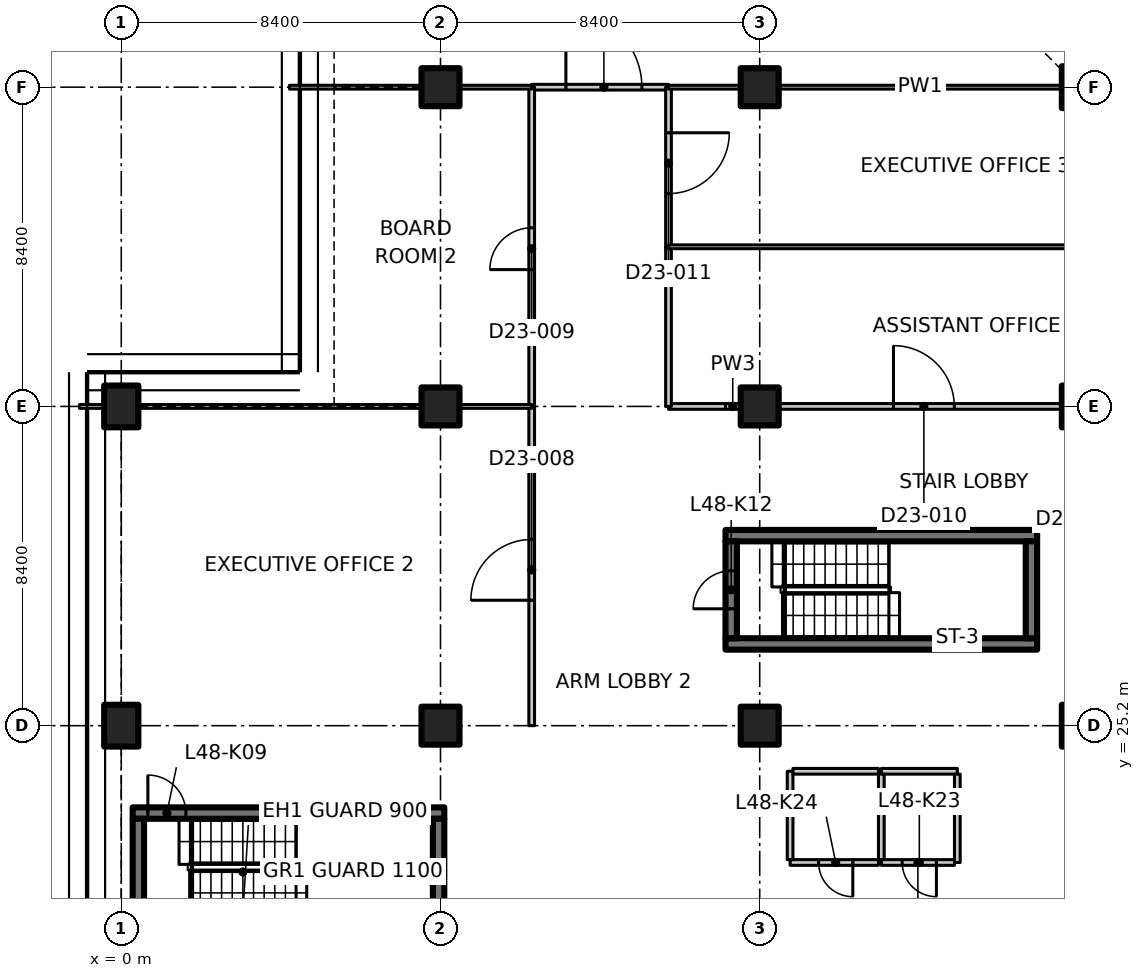
"""IFC4 building model, lengths in metres.
Left out: names, types, materials, properties, quantities, classifications, styles, units other than length and angle.
Written with IfcOpenShell. Run it as: python <this file> out.ifc"""

import sys

from ifc_helpers import new_model, si_unit, direction, frame, frame_2d, origin, origin_2d, place, context, subcontext, project, spatial, polyline, rectangle, outline, extrude, element, fill, save


model = new_model("IFC4")
c1 = context("Model", 3, precision=1e-05, world=origin(), true_north=direction((0.0, 1.0)))
c2 = subcontext(c1, "Body", "Model", "MODEL_VIEW")
j1 = project(units=[si_unit("LENGTHUNIT", "METRE"), si_unit("PLANEANGLEUNIT", "RADIAN")], contexts=[c1])
p1 = place(None, origin())
s1 = spatial("IfcSite", under=j1, at=p1, CompositionType="ELEMENT")
p2 = place(p1, origin())
s2 = spatial("IfcBuilding", under=s1, at=p2, CompositionType="ELEMENT")
p3 = place(p2, frame((0.0, 0.0, 192.0)))
s3 = spatial("IfcBuildingStorey", under=s2, at=p3, CompositionType="ELEMENT", Elevation=192.0)
for number, where, z_axis, x_axis in (
    (1, (0.0, 25.2, 0.0), (0.0, 0.0, 1.0), (1.0, 0.0, 0.0)),
    (2, (0.0, 33.6, 0.0), (0.0, 0.0, 1.0), (1.0, 0.0, 0.0)),
):
    element("IfcColumn", number, at=place(p3, frame(where, z_axis=z_axis, x_axis=x_axis)), inside=s3, PredefinedType="COLUMN", context=c2, shape_type="SweptSolid", body=[
        extrude(rectangle(XDim=0.9, YDim=1.1, at=origin_2d()), origin(), (0.0, 0.0, 1.0), 3.35),
    ])
for number, where, z_axis, x_axis in (
    (3, (8.4, 25.2, 0.0), (0.0, 0.0, 1.0), (1.0, 0.0, 0.0)),
    (4, (8.4, 33.6, 0.0), (0.0, 0.0, 1.0), (1.0, 0.0, 0.0)),
    (5, (8.4, 42.0, 0.0), (0.0, 0.0, 1.0), (1.0, 0.0, 0.0)),
    (6, (16.8, 25.2, 0.0), (0.0, 0.0, 1.0), (1.0, 0.0, 0.0)),
    (7, (16.8, 33.6, 0.0), (0.0, 0.0, 1.0), (1.0, 0.0, 0.0)),
    (8, (16.8, 42.0, 0.0), (0.0, 0.0, 1.0), (1.0, 0.0, 0.0)),
):
    element("IfcColumn", number, at=place(p3, frame(where, z_axis=z_axis, x_axis=x_axis)), inside=s3, PredefinedType="COLUMN", context=c2, shape_type="SweptSolid", body=[
        extrude(rectangle(XDim=1.0, YDim=1.0, at=origin_2d()), origin(), (0.0, 0.0, 1.0), 3.35),
    ])
for number, where, z_axis, x_axis in (
    (9, (25.2, 25.2, 0.0), (0.0, 0.0, 1.0), (1.0, 0.0, 0.0)),
    (10, (25.2, 33.6, 0.0), (0.0, 0.0, 1.0), (1.0, 0.0, 0.0)),
    (11, (25.2, 42.0, 0.0), (0.0, 0.0, 1.0), (1.0, 0.0, 0.0)),
):
    element("IfcColumn", number, at=place(p3, frame(where, z_axis=z_axis, x_axis=x_axis)), inside=s3, PredefinedType="COLUMN", context=c2, shape_type="SweptSolid", body=[
        extrude(rectangle(XDim=0.9, YDim=1.1, at=origin_2d()), origin(), (0.0, 0.0, 1.0), 3.35),
    ])
p4 = place(p3, frame((0.3, 22.9, 0.0), z_axis=(0.0, 0.0, 1.0), x_axis=(1.0, 0.0, 0.0)))
e12 = element("IfcWall", 12, at=p4, inside=s3, PredefinedType="SHEAR", context=c2, shape_type="SweptSolid", body=[
    extrude(rectangle(XDim=8.2, YDim=0.3, at=frame_2d((4.1, 0.0))), origin(), (0.0, 0.0, 1.0), 3.35),
])
p5 = place(p4, frame((0.4, 0.0, 0.0)))
e13 = element("IfcOpeningElement", 13, at=p5, cuts=e12, PredefinedType="OPENING", context=c2, shape_type="SweptSolid", body=[
    extrude(rectangle(XDim=1.0, YDim=2.1, at=frame_2d((0.5, 1.05))), frame((0.0, 0.16, 0.0), z_axis=(0.0, -1.0, 0.0), x_axis=(1.0, 0.0, 0.0)), (0.0, 0.0, 1.0), 0.32),
])
for number, where, z_axis, x_axis in (
    (14, (0.45, 20.2, 0.0), (0.0, 0.0, 1.0), (0.0, 1.0, 0.0)),
    (15, (8.35, 20.2, 0.0), (0.0, 0.0, 1.0), (0.0, 1.0, 0.0)),
):
    element("IfcWall", number, at=place(p3, frame(where, z_axis=z_axis, x_axis=x_axis)), inside=s3, PredefinedType="SHEAR", context=c2, shape_type="SweptSolid", body=[
        extrude(rectangle(XDim=2.55, YDim=0.3, at=frame_2d((1.275, 0.0))), origin(), (0.0, 0.0, 1.0), 3.35),
    ])
for number, where, z_axis, x_axis in (
    (16, (15.9, 27.35, 0.0), (0.0, 0.0, 1.0), (1.0, 0.0, 0.0)),
    (17, (15.9, 30.2, 0.0), (0.0, 0.0, 1.0), (1.0, 0.0, 0.0)),
):
    element("IfcWall", number, at=place(p3, frame(where, z_axis=z_axis, x_axis=x_axis)), inside=s3, PredefinedType="SHEAR", context=c2, shape_type="SweptSolid", body=[
        extrude(rectangle(XDim=8.2, YDim=0.3, at=frame_2d((4.1, 0.0))), origin(), (0.0, 0.0, 1.0), 3.35),
    ])
p6 = place(p3, frame((16.05, 27.5, 0.0), z_axis=(0.0, 0.0, 1.0), x_axis=(0.0, 1.0, 0.0)))
e18 = element("IfcWall", 18, at=p6, inside=s3, PredefinedType="SHEAR", context=c2, shape_type="SweptSolid", body=[
    extrude(rectangle(XDim=2.55, YDim=0.3, at=frame_2d((1.275, 0.0))), origin(), (0.0, 0.0, 1.0), 3.35),
])
p7 = place(p6, frame((0.775, 0.0, 0.0)))
e19 = element("IfcOpeningElement", 19, at=p7, cuts=e18, PredefinedType="OPENING", context=c2, shape_type="SweptSolid", body=[
    extrude(rectangle(XDim=1.0, YDim=2.1, at=frame_2d((0.5, 1.05))), frame((0.0, 0.16, 0.0), z_axis=(0.0, -1.0, 0.0), x_axis=(1.0, 0.0, 0.0)), (0.0, 0.0, 1.0), 0.32),
])
p8 = place(p3, frame((23.95, 27.5, 0.0), z_axis=(0.0, 0.0, 1.0), x_axis=(0.0, 1.0, 0.0)))
e20 = element("IfcWall", 20, at=p8, inside=s3, PredefinedType="SHEAR", context=c2, shape_type="SweptSolid", body=[
    extrude(rectangle(XDim=2.55, YDim=0.3, at=frame_2d((1.275, 0.0))), origin(), (0.0, 0.0, 1.0), 3.35),
])
p9 = place(p3, frame((20.0, 24.0, 0.0), z_axis=(0.0, 0.0, 1.0), x_axis=(1.0, 0.0, 0.0)))
e21 = element("IfcWall", 21, at=p9, inside=s3, PredefinedType="PARTITIONING", context=c2, shape_type="SweptSolid", body=[
    extrude(rectangle(XDim=2.0, YDim=0.15, at=frame_2d((1.0, 0.0))), origin(), (0.0, 0.0, 1.0), 3.35),
])
p10 = place(p3, frame((22.0, 23.925, 0.0), z_axis=(0.0, 0.0, 1.0), x_axis=(0.0, -1.0, 0.0)))
e22 = element("IfcWall", 22, at=p10, inside=s3, PredefinedType="PARTITIONING", context=c2, shape_type="SweptSolid", body=[
    extrude(rectangle(XDim=2.325, YDim=0.15, at=frame_2d((1.163, 0.0))), origin(), (0.0, 0.0, 1.0), 3.35),
])
p11 = place(p3, frame((21.925, 21.6, 0.0), z_axis=(0.0, 0.0, 1.0), x_axis=(-1.0, 0.0, 0.0)))
e23 = element("IfcWall", 23, at=p11, inside=s3, PredefinedType="PARTITIONING", context=c2, shape_type="SweptSolid", body=[
    extrude(rectangle(XDim=1.925, YDim=0.15, at=frame_2d((0.962, 0.0))), origin(), (0.0, 0.0, 1.0), 3.35),
])
p12 = place(p11, frame((0.475, 0.0, 0.0)))
e24 = element("IfcOpeningElement", 24, at=p12, cuts=e23, PredefinedType="OPENING", context=c2, shape_type="SweptSolid", body=[
    extrude(rectangle(XDim=0.9, YDim=2.1, at=frame_2d((0.45, 1.05))), frame((0.0, 0.085, 0.0), z_axis=(0.0, -1.0, 0.0), x_axis=(1.0, 0.0, 0.0)), (0.0, 0.0, 1.0), 0.17),
])
p13 = place(p3, frame((20.0, 21.675, 0.0), z_axis=(0.0, 0.0, 1.0), x_axis=(0.0, 1.0, 0.0)))
e25 = element("IfcWall", 25, at=p13, inside=s3, PredefinedType="PARTITIONING", context=c2, shape_type="SweptSolid", body=[
    extrude(rectangle(XDim=2.25, YDim=0.15, at=frame_2d((1.125, 0.0))), origin(), (0.0, 0.0, 1.0), 3.35),
])
p14 = place(p3, frame((19.925, 21.6, 0.0), z_axis=(0.0, 0.0, 1.0), x_axis=(-1.0, 0.0, 0.0)))
e26 = element("IfcWall", 26, at=p14, inside=s3, PredefinedType="PARTITIONING", context=c2, shape_type="SweptSolid", body=[
    extrude(rectangle(XDim=2.325, YDim=0.15, at=frame_2d((1.163, 0.0))), origin(), (0.0, 0.0, 1.0), 3.35),
])
p15 = place(p14, frame((0.675, 0.0, 0.0)))
e27 = element("IfcOpeningElement", 27, at=p15, cuts=e26, PredefinedType="OPENING", context=c2, shape_type="SweptSolid", body=[
    extrude(rectangle(XDim=0.9, YDim=2.1, at=frame_2d((0.45, 1.05))), frame((0.0, 0.085, 0.0), z_axis=(0.0, -1.0, 0.0), x_axis=(1.0, 0.0, 0.0)), (0.0, 0.0, 1.0), 0.17),
])
p16 = place(p3, frame((17.6, 21.675, 0.0), z_axis=(0.0, 0.0, 1.0), x_axis=(0.0, 1.0, 0.0)))
e28 = element("IfcWall", 28, at=p16, inside=s3, PredefinedType="PARTITIONING", context=c2, shape_type="SweptSolid", body=[
    extrude(rectangle(XDim=2.325, YDim=0.15, at=frame_2d((1.163, 0.0))), origin(), (0.0, 0.0, 1.0), 3.35),
])
p17 = place(p3, frame((17.675, 24.0, 0.0), z_axis=(0.0, 0.0, 1.0), x_axis=(1.0, 0.0, 0.0)))
e29 = element("IfcWall", 29, at=p17, inside=s3, PredefinedType="PARTITIONING", context=c2, shape_type="SweptSolid", body=[
    extrude(rectangle(XDim=2.25, YDim=0.15, at=frame_2d((1.125, 0.0))), origin(), (0.0, 0.0, 1.0), 3.35),
])
p18 = place(p3, frame((10.8, 25.2, 0.0), z_axis=(0.0, 0.0, 1.0), x_axis=(0.0, 1.0, 0.0)))
e30 = element("IfcWall", 30, at=p18, inside=s3, PredefinedType="PARTITIONING", context=c2, shape_type="SweptSolid", body=[
    extrude(rectangle(XDim=8.4, YDim=0.15, at=frame_2d((4.2, 0.0))), origin(), (0.0, 0.0, 1.0), 3.33),
])
p19 = place(p18, frame((3.3, 0.0, 0.0)))
e31 = element("IfcOpeningElement", 31, at=p19, cuts=e30, PredefinedType="OPENING", context=c2, shape_type="SweptSolid", body=[
    extrude(rectangle(XDim=1.6, YDim=2.1, at=frame_2d((0.8, 1.05))), frame((0.0, 0.085, 0.0), z_axis=(0.0, -1.0, 0.0), x_axis=(1.0, 0.0, 0.0)), (0.0, 0.0, 1.0), 0.17),
])
p20 = place(p3, frame((14.4, 33.6, 0.0), z_axis=(0.0, 0.0, 1.0), x_axis=(1.0, 0.0, 0.0)))
e32 = element("IfcWall", 32, at=p20, inside=s3, PredefinedType="PARTITIONING", context=c2, shape_type="SweptSolid", body=[
    extrude(rectangle(XDim=1.5, YDim=0.15, at=frame_2d((0.75, 0.0))), origin(), (0.0, 0.0, 1.0), 3.33),
])
p21 = place(p3, frame((15.9, 33.6, 0.0), z_axis=(0.0, 0.0, 1.0), x_axis=(1.0, 0.0, 0.0)))
e33 = element("IfcWall", 33, at=p21, inside=s3, PredefinedType="PARTITIONING", context=c2, shape_type="SweptSolid", body=[
    extrude(rectangle(XDim=0.38, YDim=0.15, at=frame_2d((0.19, 0.0))), origin(), (0.0, 0.0, 1.0), 3.33),
])
p22 = place(p3, frame((17.32, 33.6, 0.0), z_axis=(0.0, 0.0, 1.0), x_axis=(1.0, 0.0, 0.0)))
e34 = element("IfcWall", 34, at=p22, inside=s3, PredefinedType="PARTITIONING", context=c2, shape_type="SweptSolid", body=[
    extrude(rectangle(XDim=7.41, YDim=0.15, at=frame_2d((3.705, 0.0))), origin(), (0.0, 0.0, 1.0), 3.33),
])
p23 = place(p22, frame((3.0, 0.0, 0.0)))
e35 = element("IfcOpeningElement", 35, at=p23, cuts=e34, PredefinedType="OPENING", context=c2, shape_type="SweptSolid", body=[
    extrude(rectangle(XDim=1.6, YDim=2.1, at=frame_2d((0.8, 1.05))), frame((0.0, 0.085, 0.0), z_axis=(0.0, -1.0, 0.0), x_axis=(1.0, 0.0, 0.0)), (0.0, 0.0, 1.0), 0.17),
])
p24 = place(p3, frame((10.8, 42.0, 0.0), z_axis=(0.0, 0.0, 1.0), x_axis=(1.0, 0.0, 0.0)))
e36 = element("IfcWall", 36, at=p24, inside=s3, PredefinedType="PARTITIONING", context=c2, shape_type="SweptSolid", body=[
    extrude(rectangle(XDim=3.6, YDim=0.15, at=frame_2d((1.8, 0.0))), origin(), (0.0, 0.0, 1.0), 3.33),
])
p25 = place(p24, frame((0.9, 0.0, 0.0)))
e37 = element("IfcOpeningElement", 37, at=p25, cuts=e36, PredefinedType="OPENING", context=c2, shape_type="SweptSolid", body=[
    extrude(rectangle(XDim=2.0, YDim=2.4, at=frame_2d((1.0, 1.2))), frame((0.0, 0.085, 0.0), z_axis=(0.0, -1.0, 0.0), x_axis=(1.0, 0.0, 0.0)), (0.0, 0.0, 1.0), 0.17),
])
p26 = place(p3, frame((10.8, 33.6, 0.0), z_axis=(0.0, 0.0, 1.0), x_axis=(0.0, 1.0, 0.0)))
e38 = element("IfcWall", 38, at=p26, inside=s3, PredefinedType="PARTITIONING", context=c2, shape_type="SweptSolid", body=[
    extrude(rectangle(XDim=8.4, YDim=0.15, at=frame_2d((4.2, 0.0))), origin(), (0.0, 0.0, 1.0), 3.33),
])
p27 = place(p26, frame((3.6, 0.0, 0.0)))
e39 = element("IfcOpeningElement", 39, at=p27, cuts=e38, PredefinedType="OPENING", context=c2, shape_type="SweptSolid", body=[
    extrude(rectangle(XDim=1.1, YDim=2.1, at=frame_2d((0.55, 1.05))), frame((0.0, 0.085, 0.0), z_axis=(0.0, -1.0, 0.0), x_axis=(1.0, 0.0, 0.0)), (0.0, 0.0, 1.0), 0.17),
])
p28 = place(p3, frame((14.4, 37.8, 0.0), z_axis=(0.0, 0.0, 1.0), x_axis=(0.0, -1.0, 0.0)))
e40 = element("IfcWall", 40, at=p28, inside=s3, PredefinedType="PARTITIONING", context=c2, shape_type="SweptSolid", body=[
    extrude(rectangle(XDim=4.2, YDim=0.15, at=frame_2d((2.1, 0.0))), origin(), (0.0, 0.0, 1.0), 3.33),
])
p29 = place(p3, frame((14.4, 42.0, 0.0), z_axis=(0.0, 0.0, 1.0), x_axis=(0.0, -1.0, 0.0)))
e41 = element("IfcWall", 41, at=p29, inside=s3, PredefinedType="PARTITIONING", context=c2, shape_type="SweptSolid", body=[
    extrude(rectangle(XDim=4.2, YDim=0.15, at=frame_2d((2.1, 0.0))), origin(), (0.0, 0.0, 1.0), 3.33),
])
p30 = place(p29, frame((1.2, 0.0, 0.0)))
e42 = element("IfcOpeningElement", 42, at=p30, cuts=e41, PredefinedType="OPENING", context=c2, shape_type="SweptSolid", body=[
    extrude(rectangle(XDim=1.6, YDim=2.1, at=frame_2d((0.8, 1.05))), frame((0.0, 0.085, 0.0), z_axis=(0.0, -1.0, 0.0), x_axis=(1.0, 0.0, 0.0)), (0.0, 0.0, 1.0), 0.17),
])
p31 = place(p3, frame((10.8, 42.0, 0.0), z_axis=(0.0, 0.0, 1.0), x_axis=(-1.0, 0.0, 0.0)))
e43 = element("IfcWall", 43, at=p31, inside=s3, PredefinedType="PARTITIONING", context=c2, shape_type="SweptSolid", body=[
    extrude(rectangle(XDim=1.88, YDim=0.1, at=frame_2d((0.94, 0.0))), origin(), (0.0, 0.0, 1.0), 3.33),
])
p32 = place(p3, frame((7.88, 42.0, 0.0), z_axis=(0.0, 0.0, 1.0), x_axis=(-1.0, 0.0, 0.0)))
e44 = element("IfcWall", 44, at=p32, inside=s3, PredefinedType="PARTITIONING", context=c2, shape_type="SweptSolid", body=[
    extrude(rectangle(XDim=3.454, YDim=0.1, at=frame_2d((1.727, 0.0))), origin(), (0.0, 0.0, 1.0), 2.98),
])
p33 = place(p3, frame((24.73, 42.0, 0.0), z_axis=(0.0, 0.0, 1.0), x_axis=(-1.0, 0.0, 0.0)))
e45 = element("IfcWall", 45, at=p33, inside=s3, PredefinedType="PARTITIONING", context=c2, shape_type="SweptSolid", body=[
    extrude(outline(polyline([(0.0, 0.0), (7.41, 0.0), (7.41, 3.33), (0.196, 3.33), (0.194, 2.98), (0.0, 2.98), (0.0, 0.0)])), frame((0.0, 0.05, 0.0), z_axis=(0.0, -1.0, 0.0), x_axis=(1.0, 0.0, 0.0)), (0.0, 0.0, 1.0), 0.1),
])
p34 = place(p3, frame((16.28, 42.0, 0.0), z_axis=(0.0, 0.0, 1.0), x_axis=(-1.0, 0.0, 0.0)))
e46 = element("IfcWall", 46, at=p34, inside=s3, PredefinedType="PARTITIONING", context=c2, shape_type="SweptSolid", body=[
    extrude(rectangle(XDim=1.88, YDim=0.1, at=frame_2d((0.94, 0.0))), origin(), (0.0, 0.0, 1.0), 3.33),
])
p35 = place(p3, frame((-1.1, 33.6, 0.0), z_axis=(0.0, 0.0, 1.0), x_axis=(1.0, 0.0, 0.0)))
e47 = element("IfcWall", 47, at=p35, inside=s3, PredefinedType="PARTITIONING", context=c2, shape_type="SweptSolid", body=[
    extrude(rectangle(XDim=0.63, YDim=0.1, at=frame_2d((0.315, 0.0))), origin(), (0.0, 0.0, 1.0), 3.33),
])
p36 = place(p3, frame((0.47, 33.6, 0.0), z_axis=(0.0, 0.0, 1.0), x_axis=(1.0, 0.0, 0.0)))
e48 = element("IfcWall", 48, at=p36, inside=s3, PredefinedType="PARTITIONING", context=c2, shape_type="SweptSolid", body=[
    extrude(outline(polyline([(0.0, 0.0), (7.41, 0.0), (7.41, 2.98), (0.0, 2.98), (0.0, 0.0)])), frame((0.0, 0.05, 0.0), z_axis=(0.0, -1.0, 0.0), x_axis=(1.0, 0.0, 0.0)), (0.0, 0.0, 1.0), 0.1),
])
p37 = place(p3, frame((8.92, 33.6, 0.0), z_axis=(0.0, 0.0, 1.0), x_axis=(1.0, 0.0, 0.0)))
e49 = element("IfcWall", 49, at=p37, inside=s3, PredefinedType="PARTITIONING", context=c2, shape_type="SweptSolid", body=[
    extrude(rectangle(XDim=1.88, YDim=0.1, at=frame_2d((0.94, 0.0))), origin(), (0.0, 0.0, 1.0), 3.33),
])
p38 = place(p3, frame((14.4, 37.8, 0.0), z_axis=(0.0, 0.0, 1.0), x_axis=(1.0, 0.0, 0.0)))
e50 = element("IfcWall", 50, at=p38, inside=s3, PredefinedType="PARTITIONING", context=c2, shape_type="SweptSolid", body=[
    extrude(outline(polyline([(0.0, 0.0), (15.843, 0.0), (15.843, 3.33), (11.25, 3.33), (11.248, 2.98), (10.352, 2.98), (10.35, 3.33), (0.0, 3.33), (0.0, 0.0)])), frame((0.0, 0.05, 0.0), z_axis=(0.0, -1.0, 0.0), x_axis=(1.0, 0.0, 0.0)), (0.0, 0.0, 1.0), 0.1),
])
p39 = place(p5, origin())
e51 = element("IfcDoor", 51, at=p39, inside=s3, OperationType="SINGLE_SWING_RIGHT", PredefinedType="DOOR", context=c2, shape_type="SweptSolid", body=[
    extrude(rectangle(XDim=1.0, YDim=2.1, at=frame_2d((0.5, 1.05))), frame((0.0, 0.025, 0.0), z_axis=(0.0, -1.0, 0.0), x_axis=(1.0, 0.0, 0.0)), (0.0, 0.0, 1.0), 0.05),
])
fill(e13, e51)
p40 = place(p7, origin())
e52 = element("IfcDoor", 52, at=p40, inside=s3, OperationType="SINGLE_SWING_LEFT", PredefinedType="DOOR", context=c2, shape_type="SweptSolid", body=[
    extrude(rectangle(XDim=1.0, YDim=2.1, at=frame_2d((0.5, 1.05))), frame((0.0, 0.025, 0.0), z_axis=(0.0, -1.0, 0.0), x_axis=(1.0, 0.0, 0.0)), (0.0, 0.0, 1.0), 0.05),
])
fill(e19, e52)
p41 = place(p12, origin())
e53 = element("IfcDoor", 53, at=p41, inside=s3, OperationType="SINGLE_SWING_RIGHT", PredefinedType="DOOR", context=c2, shape_type="SweptSolid", body=[
    extrude(rectangle(XDim=0.9, YDim=2.1, at=frame_2d((0.45, 1.05))), frame((0.0, 0.025, 0.0), z_axis=(0.0, -1.0, 0.0), x_axis=(1.0, 0.0, 0.0)), (0.0, 0.0, 1.0), 0.05),
])
fill(e24, e53)
p42 = place(p15, origin())
e54 = element("IfcDoor", 54, at=p42, inside=s3, OperationType="SINGLE_SWING_LEFT", PredefinedType="DOOR", context=c2, shape_type="SweptSolid", body=[
    extrude(rectangle(XDim=0.9, YDim=2.1, at=frame_2d((0.45, 1.05))), frame((0.0, 0.025, 0.0), z_axis=(0.0, -1.0, 0.0), x_axis=(1.0, 0.0, 0.0)), (0.0, 0.0, 1.0), 0.05),
])
fill(e27, e54)
p43 = place(p25, origin())
e55 = element("IfcDoor", 55, at=p43, inside=s3, OperationType="DOUBLE_DOOR_SINGLE_SWING", PredefinedType="DOOR", context=c2, shape_type="SweptSolid", body=[
    extrude(rectangle(XDim=2.0, YDim=2.4, at=frame_2d((1.0, 1.2))), frame((0.0, 0.025, 0.0), z_axis=(0.0, -1.0, 0.0), x_axis=(1.0, 0.0, 0.0)), (0.0, 0.0, 1.0), 0.05),
])
fill(e37, e55)
p44 = place(p19, origin())
e56 = element("IfcDoor", 56, at=p44, inside=s3, OperationType="DOUBLE_DOOR_SINGLE_SWING", PredefinedType="DOOR", context=c2, shape_type="SweptSolid", body=[
    extrude(rectangle(XDim=1.6, YDim=2.1, at=frame_2d((0.8, 1.05))), frame((0.0, 0.025, 0.0), z_axis=(0.0, -1.0, 0.0), x_axis=(1.0, 0.0, 0.0)), (0.0, 0.0, 1.0), 0.05),
])
fill(e31, e56)
p45 = place(p27, origin())
e57 = element("IfcDoor", 57, at=p45, inside=s3, OperationType="SINGLE_SWING_LEFT", PredefinedType="DOOR", context=c2, shape_type="SweptSolid", body=[
    extrude(rectangle(XDim=1.1, YDim=2.1, at=frame_2d((0.55, 1.05))), frame((0.0, 0.025, 0.0), z_axis=(0.0, -1.0, 0.0), x_axis=(1.0, 0.0, 0.0)), (0.0, 0.0, 1.0), 0.05),
])
fill(e39, e57)
p46 = place(p23, origin())
e58 = element("IfcDoor", 58, at=p46, inside=s3, OperationType="DOUBLE_DOOR_SINGLE_SWING", PredefinedType="DOOR", context=c2, shape_type="SweptSolid", body=[
    extrude(rectangle(XDim=1.6, YDim=2.1, at=frame_2d((0.8, 1.05))), frame((0.0, 0.025, 0.0), z_axis=(0.0, -1.0, 0.0), x_axis=(1.0, 0.0, 0.0)), (0.0, 0.0, 1.0), 0.05),
])
fill(e35, e58)
p47 = place(p30, origin())
e59 = element("IfcDoor", 59, at=p47, inside=s3, OperationType="DOUBLE_DOOR_SINGLE_SWING", PredefinedType="DOOR", context=c2, shape_type="SweptSolid", body=[
    extrude(rectangle(XDim=1.6, YDim=2.1, at=frame_2d((0.8, 1.05))), frame((0.0, 0.025, 0.0), z_axis=(0.0, -1.0, 0.0), x_axis=(1.0, 0.0, 0.0)), (0.0, 0.0, 1.0), 0.05),
])
fill(e42, e59)
save(model, sys.argv[1])
